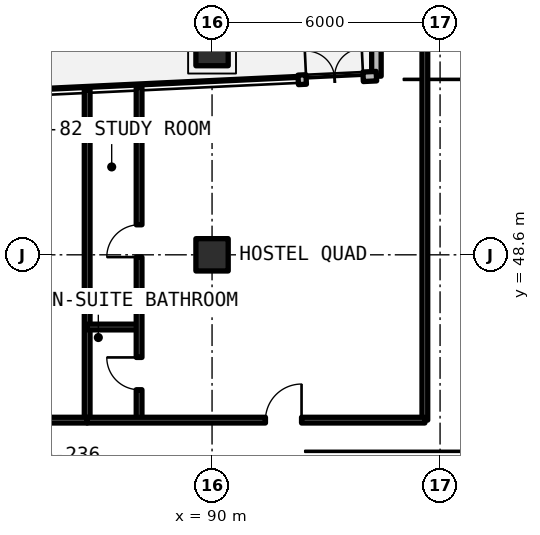
"""IFC4 building model, lengths in metres.
Left out: names, types, materials, properties, quantities, classifications, styles, units other than length and angle.
Written with IfcOpenShell. Run it as: python <this file> out.ifc"""

import sys

from ifc_helpers import new_model, si_unit, direction, frame, frame_2d, origin, origin_2d, place, context, subcontext, project, spatial, rectangle, extrude, element, fill, save


model = new_model("IFC4")
c1 = context("Model", 3, precision=1e-05, world=origin(), true_north=direction((0.0, 1.0)))
c2 = subcontext(c1, "Body", "Model", "MODEL_VIEW")
j1 = project(units=[si_unit("LENGTHUNIT", "METRE"), si_unit("PLANEANGLEUNIT", "RADIAN")], contexts=[c1])
p1 = place(None, origin())
s1 = spatial("IfcSite", under=j1, at=p1, CompositionType="ELEMENT")
p2 = place(p1, origin())
s2 = spatial("IfcBuilding", under=s1, at=p2, CompositionType="ELEMENT")
p3 = place(p2, frame((0.0, 0.0, 158.4)))
s3 = spatial("IfcBuildingStorey", under=s2, at=p3, CompositionType="ELEMENT", Elevation=158.4)
for number, where, z_axis, x_axis in (
    (1, (90.0, 48.6, 0.0), (0.0, 0.0, 1.0), (1.0, 0.0, 0.0)),
    (2, (90.0, 54.0, 0.0), (0.0, 0.0, 1.0), (1.0, 0.0, 0.0)),
):
    element("IfcColumn", number, at=place(p3, frame(where, z_axis=z_axis, x_axis=x_axis)), inside=s3, PredefinedType="COLUMN", context=c2, shape_type="SweptSolid", body=[
        extrude(rectangle(XDim=0.85, YDim=0.85, at=origin_2d()), origin(), (0.0, 0.0, 1.0), 3.63),
    ])
p4 = place(p3, frame((99.875, 51.048, 0.0), z_axis=(0.0, 0.0, 1.0), x_axis=(-0.70708586489, 0.707127696864, 0.0)))
e3 = element("IfcWall", 3, at=p4, inside=s3, PredefinedType="SOLIDWALL", context=c2, shape_type="SweptSolid", body=[
    extrude(rectangle(XDim=5.836, YDim=0.25, at=frame_2d((2.918, 0.0))), origin(), (0.0, 0.0, 1.0), 3.41),
])
p5 = place(p4, frame((1.218, 0.0, 0.78)))
e4 = element("IfcOpeningElement", 4, at=p5, cuts=e3, PredefinedType="OPENING", context=c2, shape_type="SweptSolid", body=[
    extrude(rectangle(XDim=3.4, YDim=1.66, at=frame_2d((1.7, 0.83))), frame((0.0, 0.135, 0.0), z_axis=(0.0, -1.0, 0.0), x_axis=(1.0, 0.0, 0.0)), (0.0, 0.0, 1.0), 0.27),
])
p6 = place(p3, frame((94.325, 55.175, 0.0), z_axis=(0.0, 0.0, 1.0), x_axis=(0.0, -1.0, 0.0)))
e5 = element("IfcWall", 5, at=p6, inside=s3, PredefinedType="SOLIDWALL", context=c2, shape_type="SweptSolid", body=[
    extrude(rectangle(XDim=1.874, YDim=0.25, at=frame_2d((0.937, 0.0))), origin(), (0.0, 0.0, 1.0), 3.41),
])
p7 = place(p3, frame((94.325, 53.301, 0.0), z_axis=(0.0, 0.0, 1.0), x_axis=(-0.998881238641, -0.047289228075, 0.0)))
e6 = element("IfcWall", 6, at=p7, inside=s3, PredefinedType="SOLIDWALL", context=c2, shape_type="SweptSolid", body=[
    extrude(rectangle(XDim=2.06, YDim=0.25, at=frame_2d((1.03, 0.0))), origin(), (0.0, 0.0, 1.0), 3.41),
])
p8 = place(p7, frame((0.35, 0.0, 0.0)))
e7 = element("IfcOpeningElement", 7, at=p8, cuts=e6, PredefinedType="OPENING", context=c2, shape_type="SweptSolid", body=[
    extrude(rectangle(XDim=1.5, YDim=2.2, at=frame_2d((0.75, 1.1))), frame((0.0, 0.135, 0.0), z_axis=(0.0, -1.0, 0.0), x_axis=(1.0, 0.0, 0.0)), (0.0, 0.0, 1.0), 0.27),
])
p9 = place(p3, frame((95.6, 44.25, 0.0), z_axis=(0.0, 0.0, 1.0), x_axis=(0.0, 1.0, 0.0)))
e8 = element("IfcWall", 8, at=p9, inside=s3, PredefinedType="SOLIDWALL", context=c2, shape_type="SweptSolid", body=[
    extrude(rectangle(XDim=10.925, YDim=0.15, at=frame_2d((5.462, 0.0))), origin(), (0.0, 0.0, 1.0), 2.63),
])
p10 = place(p3, frame((86.714, 44.25, 0.0), z_axis=(0.0, 0.0, 1.0), x_axis=(0.0, 1.0, 0.0)))
e9 = element("IfcWall", 9, at=p10, inside=s3, PredefinedType="SOLIDWALL", context=c2, shape_type="SweptSolid", body=[
    extrude(rectangle(XDim=8.69, YDim=0.15, at=frame_2d((4.345, 0.0))), origin(), (0.0, 0.0, 1.0), 2.63),
])
p11 = place(p3, frame((74.971, 44.25, 0.0), z_axis=(0.0, 0.0, 1.0), x_axis=(1.0, 0.0, 0.0)))
e10 = element("IfcWall", 10, at=p11, inside=s3, PredefinedType="SOLIDWALL", context=c2, shape_type="SweptSolid", body=[
    extrude(rectangle(XDim=11.743, YDim=0.15, at=frame_2d((5.872, 0.0))), origin(), (0.0, 0.0, 1.0), 2.63),
])
p12 = place(p11, frame((5.321, 0.0, 0.0)))
e11 = element("IfcOpeningElement", 11, at=p12, cuts=e10, PredefinedType="OPENING", context=c2, shape_type="SweptSolid", body=[
    extrude(rectangle(XDim=1.1, YDim=2.15, at=frame_2d((0.55, 1.075))), frame((0.0, 0.085, 0.0), z_axis=(0.0, -1.0, 0.0), x_axis=(1.0, 0.0, 0.0)), (0.0, 0.0, 1.0), 0.17),
])
p13 = place(p3, frame((86.714, 46.7, 0.0), z_axis=(0.0, 0.0, 1.0), x_axis=(1.0, 0.0, 0.0)))
e12 = element("IfcWall", 12, at=p13, inside=s3, PredefinedType="PARTITIONING", context=c2, shape_type="SweptSolid", body=[
    extrude(rectangle(XDim=1.366, YDim=0.15, at=frame_2d((0.683, 0.0))), origin(), (0.0, 0.0, 1.0), 2.63),
])
p14 = place(p3, frame((88.08, 44.25, 0.0), z_axis=(0.0, 0.0, 1.0), x_axis=(0.0, 1.0, 0.0)))
e13 = element("IfcWall", 13, at=p14, inside=s3, PredefinedType="PARTITIONING", context=c2, shape_type="SweptSolid", body=[
    extrude(rectangle(XDim=8.755, YDim=0.15, at=frame_2d((4.377, 0.0))), origin(), (0.0, 0.0, 1.0), 2.63),
])
p15 = place(p14, frame((0.8, 0.0, 0.0)))
e14 = element("IfcOpeningElement", 14, at=p15, cuts=e13, PredefinedType="OPENING", context=c2, shape_type="SweptSolid", body=[
    extrude(rectangle(XDim=0.85, YDim=2.1, at=frame_2d((0.425, 1.05))), frame((0.0, 0.085, 0.0), z_axis=(0.0, -1.0, 0.0), x_axis=(1.0, 0.0, 0.0)), (0.0, 0.0, 1.0), 0.17),
])
p16 = place(p14, frame((4.29, 0.0, 0.0)))
e15 = element("IfcOpeningElement", 15, at=p16, cuts=e13, PredefinedType="OPENING", context=c2, shape_type="SweptSolid", body=[
    extrude(rectangle(XDim=0.85, YDim=2.1, at=frame_2d((0.425, 1.05))), frame((0.0, 0.085, 0.0), z_axis=(0.0, -1.0, 0.0), x_axis=(1.0, 0.0, 0.0)), (0.0, 0.0, 1.0), 0.17),
])
p17 = place(p3, frame((86.714, 44.25, 0.0), z_axis=(0.0, 0.0, 1.0), x_axis=(1.0, 0.0, 0.0)))
e16 = element("IfcWall", 16, at=p17, inside=s3, PredefinedType="SOLIDWALL", context=c2, shape_type="SweptSolid", body=[
    extrude(rectangle(XDim=8.886, YDim=0.15, at=frame_2d((4.443, 0.0))), origin(), (0.0, 0.0, 1.0), 2.63),
])
p18 = place(p17, frame((4.691, 0.0, 0.0)))
e17 = element("IfcOpeningElement", 17, at=p18, cuts=e16, PredefinedType="OPENING", context=c2, shape_type="SweptSolid", body=[
    extrude(rectangle(XDim=0.95, YDim=2.15, at=frame_2d((0.475, 1.075))), frame((0.0, 0.085, 0.0), z_axis=(0.0, -1.0, 0.0), x_axis=(1.0, 0.0, 0.0)), (0.0, 0.0, 1.0), 0.17),
])
p19 = place(p8, frame((1.5, 0.0, 0.0), z_axis=(0.0, 0.0, 1.0), x_axis=(-1.0, 0.0, 0.0)))
e18 = element("IfcDoor", 18, at=p19, inside=s3, OperationType="SINGLE_SWING_RIGHT", PredefinedType="DOOR", context=c2, shape_type="SweptSolid", body=[
    extrude(rectangle(XDim=1.5, YDim=2.2, at=frame_2d((0.75, 1.1))), frame((0.0, 0.025, 0.0), z_axis=(0.0, -1.0, 0.0), x_axis=(1.0, 0.0, 0.0)), (0.0, 0.0, 1.0), 0.05),
])
fill(e7, e18)
p20 = place(p15, origin())
e19 = element("IfcDoor", 19, at=p20, inside=s3, OperationType="SINGLE_SWING_RIGHT", PredefinedType="DOOR", context=c2, shape_type="SweptSolid", body=[
    extrude(rectangle(XDim=0.85, YDim=2.1, at=frame_2d((0.425, 1.05))), frame((0.0, 0.025, 0.0), z_axis=(0.0, -1.0, 0.0), x_axis=(1.0, 0.0, 0.0)), (0.0, 0.0, 1.0), 0.05),
])
fill(e14, e19)
p21 = place(p16, origin())
e20 = element("IfcDoor", 20, at=p21, inside=s3, OperationType="SINGLE_SWING_LEFT", PredefinedType="DOOR", context=c2, shape_type="SweptSolid", body=[
    extrude(rectangle(XDim=0.85, YDim=2.1, at=frame_2d((0.425, 1.05))), frame((0.0, 0.025, 0.0), z_axis=(0.0, -1.0, 0.0), x_axis=(1.0, 0.0, 0.0)), (0.0, 0.0, 1.0), 0.05),
])
fill(e15, e20)
p22 = place(p18, origin())
e21 = element("IfcDoor", 21, at=p22, inside=s3, OperationType="SINGLE_SWING_RIGHT", PredefinedType="DOOR", context=c2, shape_type="SweptSolid", body=[
    extrude(rectangle(XDim=0.95, YDim=2.15, at=frame_2d((0.475, 1.075))), frame((0.0, 0.025, 0.0), z_axis=(0.0, -1.0, 0.0), x_axis=(1.0, 0.0, 0.0)), (0.0, 0.0, 1.0), 0.05),
])
fill(e17, e21)
save(model, sys.argv[1])
